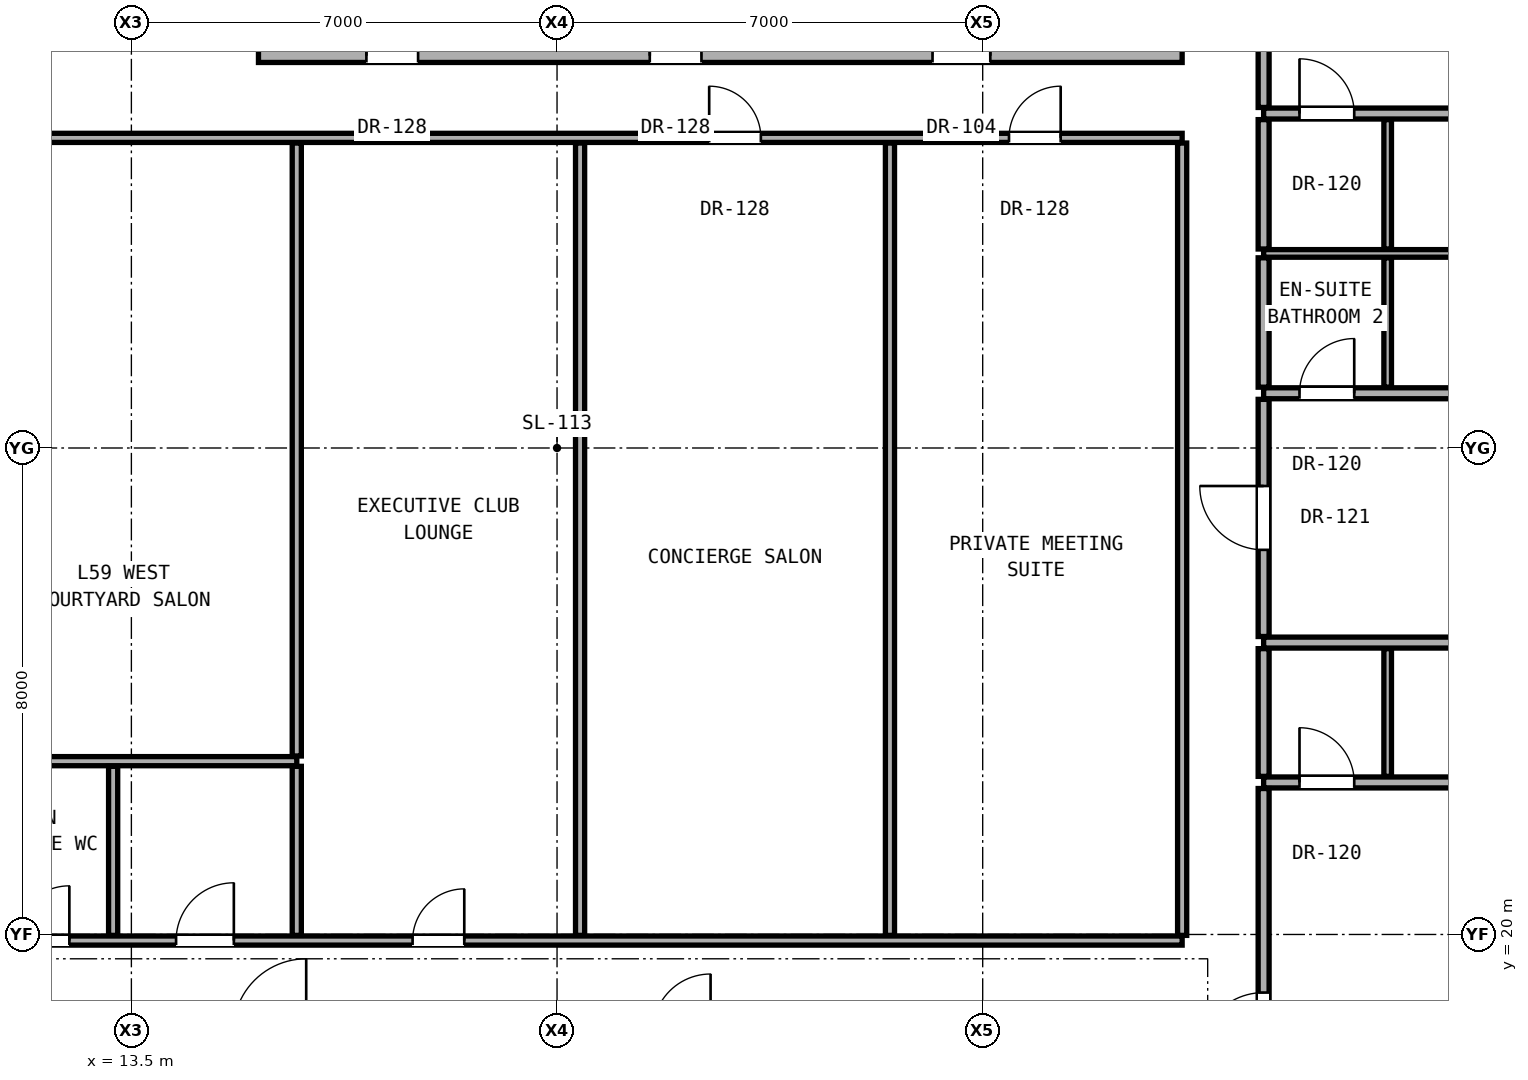
"""IFC4 building model, lengths in metres.
Left out: names, types, materials, properties, quantities, classifications, styles, units other than length and angle.
Written with IfcOpenShell. Run it as: python <this file> out.ifc"""

import sys

from ifc_helpers import new_model, si_unit, direction, frame, frame_2d, origin, place, context, subcontext, project, spatial, rectangle, extrude, element, fill, save


model = new_model("IFC4")
c1 = context("Model", 3, precision=1e-05, world=origin(), true_north=direction((0.0, 1.0)))
c2 = subcontext(c1, "Body", "Model", "MODEL_VIEW")
j1 = project(units=[si_unit("LENGTHUNIT", "METRE"), si_unit("PLANEANGLEUNIT", "RADIAN")], contexts=[c1])
p1 = place(None, origin())
s1 = spatial("IfcSite", under=j1, at=p1, CompositionType="ELEMENT")
p2 = place(p1, origin())
s2 = spatial("IfcBuilding", under=s1, at=p2, CompositionType="ELEMENT")
p3 = place(p2, frame((0.0, 0.0, 206.4)))
s3 = spatial("IfcBuildingStorey", under=s2, at=p3, CompositionType="ELEMENT", Elevation=206.4)
p4 = place(p3, frame((10.22, 19.9, 0.0), z_axis=(0.0, 0.0, 1.0), x_axis=(1.0, 0.0, 0.0)))
e1 = element("IfcWall", 1, at=p4, inside=s3, PredefinedType="PARTITIONING", context=c2, shape_type="SweptSolid", body=[
    extrude(rectangle(XDim=20.56, YDim=0.15, at=frame_2d((10.28, 0.0))), origin(), (0.0, 0.0, 1.0), 2.186),
])
p5 = place(p4, frame((1.36, 0.0, 0.0)))
e2 = element("IfcOpeningElement", 2, at=p5, cuts=e1, PredefinedType="OPENING", context=c2, shape_type="SweptSolid", body=[
    extrude(rectangle(XDim=0.9, YDim=2.1, at=frame_2d((0.45, 1.05))), frame((0.0, 0.085, 0.0), z_axis=(0.0, -1.0, 0.0), x_axis=(1.0, 0.0, 0.0)), (0.0, 0.0, 1.0), 0.17),
])
p6 = place(p4, frame((4.015, 0.0, 0.0)))
e3 = element("IfcOpeningElement", 3, at=p6, cuts=e1, PredefinedType="OPENING", context=c2, shape_type="SweptSolid", body=[
    extrude(rectangle(XDim=0.95, YDim=2.15, at=frame_2d((0.475, 1.075))), frame((0.0, 0.085, 0.0), z_axis=(0.0, -1.0, 0.0), x_axis=(1.0, 0.0, 0.0)), (0.0, 0.0, 1.0), 0.17),
])
p7 = place(p4, frame((7.905, 0.0, 0.0)))
e4 = element("IfcOpeningElement", 4, at=p7, cuts=e1, PredefinedType="OPENING", context=c2, shape_type="SweptSolid", body=[
    extrude(rectangle(XDim=0.85, YDim=2.01, at=frame_2d((0.425, 1.005))), frame((0.0, 0.085, 0.0), z_axis=(0.0, -1.0, 0.0), x_axis=(1.0, 0.0, 0.0)), (0.0, 0.0, 1.0), 0.17),
])
p8 = place(p3, frame((32.12, 22.5, 0.0), z_axis=(0.0, 0.0, 1.0), x_axis=(1.0, 0.0, 0.0)))
e5 = element("IfcWall", 5, at=p8, inside=s3, PredefinedType="PARTITIONING", context=c2, shape_type="SweptSolid", body=[
    extrude(rectangle(XDim=9.67, YDim=0.18, at=frame_2d((4.835, 0.0))), origin(), (0.0, 0.0, 1.0), 2.269),
])
p9 = place(p8, frame((5.36, 0.0, 0.0)))
e6 = element("IfcOpeningElement", 6, at=p9, cuts=e5, PredefinedType="OPENING", context=c2, shape_type="SweptSolid", body=[
    extrude(rectangle(XDim=0.95, YDim=2.15, at=frame_2d((0.475, 1.075))), frame((0.0, 0.1, 0.0), z_axis=(0.0, -1.0, 0.0), x_axis=(1.0, 0.0, 0.0)), (0.0, 0.0, 1.0), 0.2),
])
p10 = place(p8, frame((0.59, 0.0, 0.0)))
e7 = element("IfcOpeningElement", 7, at=p10, cuts=e5, PredefinedType="OPENING", context=c2, shape_type="SweptSolid", body=[
    extrude(rectangle(XDim=0.9, YDim=2.1, at=frame_2d((0.45, 1.05))), frame((0.0, 0.1, 0.0), z_axis=(0.0, -1.0, 0.0), x_axis=(1.0, 0.0, 0.0)), (0.0, 0.0, 1.0), 0.2),
])
p11 = place(p3, frame((10.22, 22.85, 0.0), z_axis=(0.0, 0.0, 1.0), x_axis=(1.0, 0.0, 0.0)))
e8 = element("IfcWall", 8, at=p11, inside=s3, PredefinedType="PARTITIONING", context=c2, shape_type="SweptSolid", body=[
    extrude(rectangle(XDim=6.0, YDim=0.15, at=frame_2d((3.0, 0.0))), origin(), (0.0, 0.0, 1.0), 2.186),
])
p12 = place(p3, frame((32.12, 24.8, 0.0), z_axis=(0.0, 0.0, 1.0), x_axis=(1.0, 0.0, 0.0)))
e9 = element("IfcWall", 9, at=p12, inside=s3, PredefinedType="PARTITIONING", context=c2, shape_type="SweptSolid", body=[
    extrude(rectangle(XDim=9.67, YDim=0.18, at=frame_2d((4.835, 0.0))), origin(), (0.0, 0.0, 1.0), 2.269),
])
p13 = place(p3, frame((32.12, 28.9, 0.0), z_axis=(0.0, 0.0, 1.0), x_axis=(1.0, 0.0, 0.0)))
e10 = element("IfcWall", 10, at=p13, inside=s3, PredefinedType="PARTITIONING", context=c2, shape_type="SweptSolid", body=[
    extrude(rectangle(XDim=9.67, YDim=0.18, at=frame_2d((4.835, 0.0))), origin(), (0.0, 0.0, 1.0), 2.269),
])
p14 = place(p13, frame((5.36, 0.0, 0.0)))
e11 = element("IfcOpeningElement", 11, at=p14, cuts=e10, PredefinedType="OPENING", context=c2, shape_type="SweptSolid", body=[
    extrude(rectangle(XDim=0.95, YDim=2.15, at=frame_2d((0.475, 1.075))), frame((0.0, 0.1, 0.0), z_axis=(0.0, -1.0, 0.0), x_axis=(1.0, 0.0, 0.0)), (0.0, 0.0, 1.0), 0.2),
])
p15 = place(p13, frame((0.59, 0.0, 0.0)))
e12 = element("IfcOpeningElement", 12, at=p15, cuts=e10, PredefinedType="OPENING", context=c2, shape_type="SweptSolid", body=[
    extrude(rectangle(XDim=0.9, YDim=2.1, at=frame_2d((0.45, 1.05))), frame((0.0, 0.1, 0.0), z_axis=(0.0, -1.0, 0.0), x_axis=(1.0, 0.0, 0.0)), (0.0, 0.0, 1.0), 0.2),
])
p16 = place(p3, frame((32.12, 31.2, 0.0), z_axis=(0.0, 0.0, 1.0), x_axis=(1.0, 0.0, 0.0)))
e13 = element("IfcWall", 13, at=p16, inside=s3, PredefinedType="PARTITIONING", context=c2, shape_type="SweptSolid", body=[
    extrude(rectangle(XDim=9.67, YDim=0.125, at=frame_2d((4.835, 0.0))), origin(), (0.0, 0.0, 1.0), 2.269),
])
p17 = place(p3, frame((10.22, 33.1, 0.0), z_axis=(0.0, 0.0, 1.0), x_axis=(1.0, 0.0, 0.0)))
e14 = element("IfcWall", 14, at=p17, inside=s3, PredefinedType="PARTITIONING", context=c2, shape_type="SweptSolid", body=[
    extrude(rectangle(XDim=20.56, YDim=0.15, at=frame_2d((10.28, 0.0))), origin(), (0.0, 0.0, 1.0), 2.186),
])
p18 = place(p17, frame((12.782, 0.0, 0.0)))
e15 = element("IfcOpeningElement", 15, at=p18, cuts=e14, PredefinedType="OPENING", context=c2, shape_type="SweptSolid", body=[
    extrude(rectangle(XDim=0.85, YDim=2.01, at=frame_2d((0.425, 1.005))), frame((0.0, 0.085, 0.0), z_axis=(0.0, -1.0, 0.0), x_axis=(1.0, 0.0, 0.0)), (0.0, 0.0, 1.0), 0.17),
])
p19 = place(p17, frame((17.712, 0.0, 0.0)))
e16 = element("IfcOpeningElement", 16, at=p19, cuts=e14, PredefinedType="OPENING", context=c2, shape_type="SweptSolid", body=[
    extrude(rectangle(XDim=0.85, YDim=2.01, at=frame_2d((0.425, 1.005))), frame((0.0, 0.085, 0.0), z_axis=(0.0, -1.0, 0.0), x_axis=(1.0, 0.0, 0.0)), (0.0, 0.0, 1.0), 0.17),
])
p20 = place(p3, frame((32.12, 33.5, 0.0), z_axis=(0.0, 0.0, 1.0), x_axis=(1.0, 0.0, 0.0)))
e17 = element("IfcWall", 17, at=p20, inside=s3, PredefinedType="PARTITIONING", context=c2, shape_type="SweptSolid", body=[
    extrude(rectangle(XDim=9.67, YDim=0.18, at=frame_2d((4.835, 0.0))), origin(), (0.0, 0.0, 1.0), 2.269),
])
p21 = place(p20, frame((5.36, 0.0, 0.0)))
e18 = element("IfcOpeningElement", 18, at=p21, cuts=e17, PredefinedType="OPENING", context=c2, shape_type="SweptSolid", body=[
    extrude(rectangle(XDim=0.95, YDim=2.15, at=frame_2d((0.475, 1.075))), frame((0.0, 0.1, 0.0), z_axis=(0.0, -1.0, 0.0), x_axis=(1.0, 0.0, 0.0)), (0.0, 0.0, 1.0), 0.2),
])
p22 = place(p20, frame((0.59, 0.0, 0.0)))
e19 = element("IfcOpeningElement", 19, at=p22, cuts=e17, PredefinedType="OPENING", context=c2, shape_type="SweptSolid", body=[
    extrude(rectangle(XDim=0.9, YDim=2.1, at=frame_2d((0.45, 1.05))), frame((0.0, 0.1, 0.0), z_axis=(0.0, -1.0, 0.0), x_axis=(1.0, 0.0, 0.0)), (0.0, 0.0, 1.0), 0.2),
])
p23 = place(p3, frame((15.59, 34.45, 0.0), z_axis=(0.0, 0.0, 1.0), x_axis=(1.0, 0.0, 0.0)))
e20 = element("IfcWall", 20, at=p23, inside=s3, PredefinedType="SOLIDWALL", context=c2, shape_type="SweptSolid", body=[
    extrude(rectangle(XDim=15.19, YDim=0.22, at=frame_2d((7.595, 0.0))), origin(), (0.0, 0.0, 1.0), 2.186),
])
p24 = place(p23, frame((6.435, 0.0, 0.0)))
e21 = element("IfcOpeningElement", 21, at=p24, cuts=e20, PredefinedType="OPENING", context=c2, shape_type="SweptSolid", body=[
    extrude(rectangle(XDim=0.85, YDim=2.01, at=frame_2d((0.425, 1.005))), frame((0.0, 0.12, 0.0), z_axis=(0.0, -1.0, 0.0), x_axis=(1.0, 0.0, 0.0)), (0.0, 0.0, 1.0), 0.24),
])
p25 = place(p23, frame((11.085, 0.0, 0.0)))
e22 = element("IfcOpeningElement", 22, at=p25, cuts=e20, PredefinedType="OPENING", context=c2, shape_type="SweptSolid", body=[
    extrude(rectangle(XDim=0.95, YDim=2.15, at=frame_2d((0.475, 1.075))), frame((0.0, 0.12, 0.0), z_axis=(0.0, -1.0, 0.0), x_axis=(1.0, 0.0, 0.0)), (0.0, 0.0, 1.0), 0.24),
])
p26 = place(p23, frame((1.775, 0.0, 0.0)))
e23 = element("IfcOpeningElement", 23, at=p26, cuts=e20, PredefinedType="OPENING", context=c2, shape_type="SweptSolid", body=[
    extrude(rectangle(XDim=0.85, YDim=2.01, at=frame_2d((0.425, 1.005))), frame((0.0, 0.12, 0.0), z_axis=(0.0, -1.0, 0.0), x_axis=(1.0, 0.0, 0.0)), (0.0, 0.0, 1.0), 0.24),
])
for number, where, z_axis, x_axis in (
    (24, (13.2, 19.985, 0.0), (0.0, 0.0, 1.0), (0.0, 1.0, 0.0)),
    (25, (16.22, 19.985, 0.0), (0.0, 0.0, 1.0), (0.0, 1.0, 0.0)),
):
    element("IfcWall", number, at=place(p3, frame(where, z_axis=z_axis, x_axis=x_axis)), inside=s3, PredefinedType="PARTITIONING", context=c2, shape_type="SweptSolid", body=[
        extrude(rectangle(XDim=2.78, YDim=0.15, at=frame_2d((1.39, 0.0))), origin(), (0.0, 0.0, 1.0), 3.05),
    ])
p27 = place(p3, frame((16.22, 22.935, 0.0), z_axis=(0.0, 0.0, 1.0), x_axis=(0.0, 1.0, 0.0)))
e26 = element("IfcWall", 26, at=p27, inside=s3, PredefinedType="PARTITIONING", context=c2, shape_type="SweptSolid", body=[
    extrude(rectangle(XDim=10.08, YDim=0.15, at=frame_2d((5.04, 0.0))), origin(), (0.0, 0.0, 1.0), 2.186),
])
for number, where, z_axis, x_axis in (
    (27, (20.879, 19.985, 0.0), (0.0, 0.0, 1.0), (0.0, 1.0, 0.0)),
    (28, (25.975, 19.985, 0.0), (0.0, 0.0, 1.0), (0.0, 1.0, 0.0)),
):
    element("IfcWall", number, at=place(p3, frame(where, z_axis=z_axis, x_axis=x_axis)), inside=s3, PredefinedType="PARTITIONING", context=c2, shape_type="SweptSolid", body=[
        extrude(rectangle(XDim=13.03, YDim=0.15, at=frame_2d((6.515, 0.0))), origin(), (0.0, 0.0, 1.0), 2.186),
    ])
p28 = place(p3, frame((30.78, 19.985, 0.0), z_axis=(0.0, 0.0, 1.0), x_axis=(0.0, 1.0, 0.0)))
e29 = element("IfcWall", 29, at=p28, inside=s3, PredefinedType="PARTITIONING", context=c2, shape_type="SweptSolid", body=[
    extrude(rectangle(XDim=13.03, YDim=0.15, at=frame_2d((6.515, 0.0))), origin(), (0.0, 0.0, 1.0), 2.346),
])
p29 = place(p3, frame((32.12, 14.639, 0.0), z_axis=(0.0, 0.0, 1.0), x_axis=(0.0, 1.0, 0.0)))
e30 = element("IfcWall", 30, at=p29, inside=s3, PredefinedType="PARTITIONING", context=c2, shape_type="SweptSolid", body=[
    extrude(rectangle(XDim=7.761, YDim=0.18, at=frame_2d((3.88, 0.0))), origin(), (0.0, 0.0, 1.0), 2.442),
])
p30 = place(p29, frame((3.355, 0.0, 0.0)))
e31 = element("IfcOpeningElement", 31, at=p30, cuts=e30, PredefinedType="OPENING", context=c2, shape_type="SweptSolid", body=[
    extrude(rectangle(XDim=1.05, YDim=2.2, at=frame_2d((0.525, 1.1))), frame((0.0, 0.1, 0.0), z_axis=(0.0, -1.0, 0.0), x_axis=(1.0, 0.0, 0.0)), (0.0, 0.0, 1.0), 0.2),
])
p31 = place(p3, frame((32.12, 22.6, 0.0), z_axis=(0.0, 0.0, 1.0), x_axis=(0.0, 1.0, 0.0)))
e32 = element("IfcWall", 32, at=p31, inside=s3, PredefinedType="PARTITIONING", context=c2, shape_type="SweptSolid", body=[
    extrude(rectangle(XDim=2.1, YDim=0.18, at=frame_2d((1.05, 0.0))), origin(), (0.0, 0.0, 1.0), 2.346),
])
p32 = place(p3, frame((32.12, 24.9, 0.0), z_axis=(0.0, 0.0, 1.0), x_axis=(0.0, 1.0, 0.0)))
e33 = element("IfcWall", 33, at=p32, inside=s3, PredefinedType="PARTITIONING", context=c2, shape_type="SweptSolid", body=[
    extrude(rectangle(XDim=3.9, YDim=0.18, at=frame_2d((1.95, 0.0))), origin(), (0.0, 0.0, 1.0), 2.346),
])
p33 = place(p32, frame((1.425, 0.0, 0.0)))
e34 = element("IfcOpeningElement", 34, at=p33, cuts=e33, PredefinedType="OPENING", context=c2, shape_type="SweptSolid", body=[
    extrude(rectangle(XDim=1.05, YDim=2.2, at=frame_2d((0.525, 1.1))), frame((0.0, 0.1, 0.0), z_axis=(0.0, -1.0, 0.0), x_axis=(1.0, 0.0, 0.0)), (0.0, 0.0, 1.0), 0.2),
])
for number, where, z_axis, x_axis in (
    (35, (32.12, 29.0, 0.0), (0.0, 0.0, 1.0), (0.0, 1.0, 0.0)),
    (36, (32.12, 31.272, 0.0), (0.0, 0.0, 1.0), (0.0, 1.0, 0.0)),
):
    element("IfcWall", number, at=place(p3, frame(where, z_axis=z_axis, x_axis=x_axis)), inside=s3, PredefinedType="PARTITIONING", context=c2, shape_type="SweptSolid", body=[
        extrude(rectangle(XDim=2.127, YDim=0.18, at=frame_2d((1.064, 0.0))), origin(), (0.0, 0.0, 1.0), 2.346),
    ])
p34 = place(p3, frame((32.12, 33.6, 0.0), z_axis=(0.0, 0.0, 1.0), x_axis=(0.0, 1.0, 0.0)))
e37 = element("IfcWall", 37, at=p34, inside=s3, PredefinedType="PARTITIONING", context=c2, shape_type="SweptSolid", body=[
    extrude(rectangle(XDim=7.761, YDim=0.18, at=frame_2d((3.88, 0.0))), origin(), (0.0, 0.0, 1.0), 2.442),
])
p35 = place(p34, frame((3.355, 0.0, 0.0)))
e38 = element("IfcOpeningElement", 38, at=p35, cuts=e37, PredefinedType="OPENING", context=c2, shape_type="SweptSolid", body=[
    extrude(rectangle(XDim=1.05, YDim=2.2, at=frame_2d((0.525, 1.1))), frame((0.0, 0.1, 0.0), z_axis=(0.0, -1.0, 0.0), x_axis=(1.0, 0.0, 0.0)), (0.0, 0.0, 1.0), 0.2),
])
p36 = place(p3, frame((34.16, 22.6, 0.0), z_axis=(0.0, 0.0, 1.0), x_axis=(0.0, 1.0, 0.0)))
e39 = element("IfcWall", 39, at=p36, inside=s3, PredefinedType="PARTITIONING", context=c2, shape_type="SweptSolid", body=[
    extrude(rectangle(XDim=2.1, YDim=0.125, at=frame_2d((1.05, 0.0))), origin(), (0.0, 0.0, 1.0), 2.346),
])
for number, where, z_axis, x_axis in (
    (40, (34.16, 29.0, 0.0), (0.0, 0.0, 1.0), (0.0, 1.0, 0.0)),
    (41, (34.16, 31.272, 0.0), (0.0, 0.0, 1.0), (0.0, 1.0, 0.0)),
):
    element("IfcWall", number, at=place(p3, frame(where, z_axis=z_axis, x_axis=x_axis)), inside=s3, PredefinedType="PARTITIONING", context=c2, shape_type="SweptSolid", body=[
        extrude(rectangle(XDim=2.127, YDim=0.125, at=frame_2d((1.064, 0.0))), origin(), (0.0, 0.0, 1.0), 2.346),
    ])
p37 = place(p24, origin())
e42 = element("IfcDoor", 42, at=p37, inside=s3, OperationType="SINGLE_SWING_LEFT", PredefinedType="DOOR", context=c2, shape_type="SweptSolid", body=[
    extrude(rectangle(XDim=0.85, YDim=2.01, at=frame_2d((0.425, 1.005))), frame((0.0, 0.025, 0.0), z_axis=(0.0, -1.0, 0.0), x_axis=(1.0, 0.0, 0.0)), (0.0, 0.0, 1.0), 0.05),
])
fill(e21, e42)
p38 = place(p25, origin())
e43 = element("IfcDoor", 43, at=p38, inside=s3, OperationType="SINGLE_SWING_RIGHT", PredefinedType="DOOR", context=c2, shape_type="SweptSolid", body=[
    extrude(rectangle(XDim=0.95, YDim=2.15, at=frame_2d((0.475, 1.075))), frame((0.0, 0.025, 0.0), z_axis=(0.0, -1.0, 0.0), x_axis=(1.0, 0.0, 0.0)), (0.0, 0.0, 1.0), 0.05),
])
fill(e22, e43)
p39 = place(p26, origin())
e44 = element("IfcDoor", 44, at=p39, inside=s3, OperationType="SINGLE_SWING_LEFT", PredefinedType="DOOR", context=c2, shape_type="SweptSolid", body=[
    extrude(rectangle(XDim=0.85, YDim=2.01, at=frame_2d((0.425, 1.005))), frame((0.0, 0.025, 0.0), z_axis=(0.0, -1.0, 0.0), x_axis=(1.0, 0.0, 0.0)), (0.0, 0.0, 1.0), 0.05),
])
fill(e23, e44)
p40 = place(p5, origin())
e45 = element("IfcDoor", 45, at=p40, inside=s3, OperationType="SINGLE_SWING_RIGHT", PredefinedType="DOOR", context=c2, shape_type="SweptSolid", body=[
    extrude(rectangle(XDim=0.9, YDim=2.1, at=frame_2d((0.45, 1.05))), frame((0.0, 0.025, 0.0), z_axis=(0.0, -1.0, 0.0), x_axis=(1.0, 0.0, 0.0)), (0.0, 0.0, 1.0), 0.05),
])
fill(e2, e45)
p41 = place(p30, origin())
e46 = element("IfcDoor", 46, at=p41, inside=s3, OperationType="SINGLE_SWING_LEFT", PredefinedType="DOOR", context=c2, shape_type="SweptSolid", body=[
    extrude(rectangle(XDim=1.05, YDim=2.2, at=frame_2d((0.525, 1.1))), frame((0.0, 0.025, 0.0), z_axis=(0.0, -1.0, 0.0), x_axis=(1.0, 0.0, 0.0)), (0.0, 0.0, 1.0), 0.05),
])
fill(e31, e46)
p42 = place(p10, origin())
e47 = element("IfcDoor", 47, at=p42, inside=s3, OperationType="SINGLE_SWING_LEFT", PredefinedType="DOOR", context=c2, shape_type="SweptSolid", body=[
    extrude(rectangle(XDim=0.9, YDim=2.1, at=frame_2d((0.45, 1.05))), frame((0.0, 0.025, 0.0), z_axis=(0.0, -1.0, 0.0), x_axis=(1.0, 0.0, 0.0)), (0.0, 0.0, 1.0), 0.05),
])
fill(e7, e47)
p43 = place(p33, origin())
e48 = element("IfcDoor", 48, at=p43, inside=s3, OperationType="SINGLE_SWING_RIGHT", PredefinedType="DOOR", context=c2, shape_type="SweptSolid", body=[
    extrude(rectangle(XDim=1.05, YDim=2.2, at=frame_2d((0.525, 1.1))), frame((0.0, 0.025, 0.0), z_axis=(0.0, -1.0, 0.0), x_axis=(1.0, 0.0, 0.0)), (0.0, 0.0, 1.0), 0.05),
])
fill(e34, e48)
p44 = place(p15, origin())
e49 = element("IfcDoor", 49, at=p44, inside=s3, OperationType="SINGLE_SWING_RIGHT", PredefinedType="DOOR", context=c2, shape_type="SweptSolid", body=[
    extrude(rectangle(XDim=0.9, YDim=2.1, at=frame_2d((0.45, 1.05))), frame((0.0, 0.025, 0.0), z_axis=(0.0, -1.0, 0.0), x_axis=(1.0, 0.0, 0.0)), (0.0, 0.0, 1.0), 0.05),
])
fill(e12, e49)
p45 = place(p22, origin())
e50 = element("IfcDoor", 50, at=p45, inside=s3, OperationType="SINGLE_SWING_LEFT", PredefinedType="DOOR", context=c2, shape_type="SweptSolid", body=[
    extrude(rectangle(XDim=0.9, YDim=2.1, at=frame_2d((0.45, 1.05))), frame((0.0, 0.025, 0.0), z_axis=(0.0, -1.0, 0.0), x_axis=(1.0, 0.0, 0.0)), (0.0, 0.0, 1.0), 0.05),
])
fill(e19, e50)
p46 = place(p6, origin())
e51 = element("IfcDoor", 51, at=p46, inside=s3, OperationType="SINGLE_SWING_RIGHT", PredefinedType="DOOR", context=c2, shape_type="SweptSolid", body=[
    extrude(rectangle(XDim=0.95, YDim=2.15, at=frame_2d((0.475, 1.075))), frame((0.0, 0.025, 0.0), z_axis=(0.0, -1.0, 0.0), x_axis=(1.0, 0.0, 0.0)), (0.0, 0.0, 1.0), 0.05),
])
fill(e3, e51)
p47 = place(p7, origin())
e52 = element("IfcDoor", 52, at=p47, inside=s3, OperationType="SINGLE_SWING_RIGHT", PredefinedType="DOOR", context=c2, shape_type="SweptSolid", body=[
    extrude(rectangle(XDim=0.85, YDim=2.01, at=frame_2d((0.425, 1.005))), frame((0.0, 0.025, 0.0), z_axis=(0.0, -1.0, 0.0), x_axis=(1.0, 0.0, 0.0)), (0.0, 0.0, 1.0), 0.05),
])
fill(e4, e52)
p48 = place(p18, origin())
e53 = element("IfcDoor", 53, at=p48, inside=s3, OperationType="SINGLE_SWING_LEFT", PredefinedType="DOOR", context=c2, shape_type="SweptSolid", body=[
    extrude(rectangle(XDim=0.85, YDim=2.01, at=frame_2d((0.425, 1.005))), frame((0.0, 0.025, 0.0), z_axis=(0.0, -1.0, 0.0), x_axis=(1.0, 0.0, 0.0)), (0.0, 0.0, 1.0), 0.05),
])
fill(e15, e53)
p49 = place(p19, origin())
e54 = element("IfcDoor", 54, at=p49, inside=s3, OperationType="SINGLE_SWING_RIGHT", PredefinedType="DOOR", context=c2, shape_type="SweptSolid", body=[
    extrude(rectangle(XDim=0.85, YDim=2.01, at=frame_2d((0.425, 1.005))), frame((0.0, 0.025, 0.0), z_axis=(0.0, -1.0, 0.0), x_axis=(1.0, 0.0, 0.0)), (0.0, 0.0, 1.0), 0.05),
])
fill(e16, e54)
save(model, sys.argv[1])
